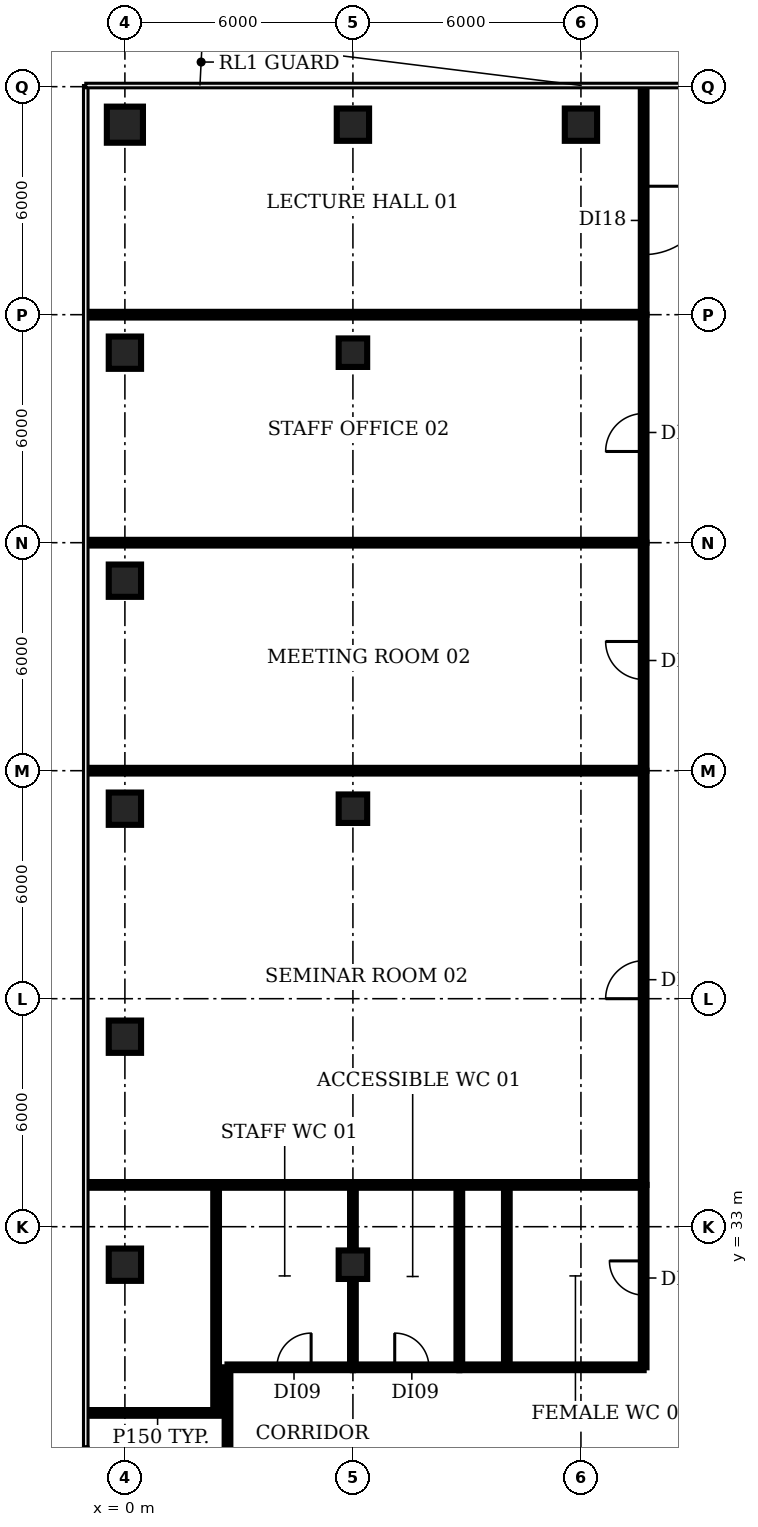
"""IFC4 building model, lengths in metres.
Left out: names, types, materials, properties, quantities, classifications, styles, units other than length and angle.
Written with IfcOpenShell. Run it as: python <this file> out.ifc"""

import sys

from ifc_helpers import new_model, si_unit, direction, frame, frame_2d, origin, origin_2d, place, context, subcontext, project, spatial, rectangle, circle, extrude, element, fill, save


model = new_model("IFC4")
c1 = context("Model", 3, precision=1e-05, world=origin(), true_north=direction((0.0, 1.0)))
c2 = subcontext(c1, "Body", "Model", "MODEL_VIEW")
j1 = project(units=[si_unit("LENGTHUNIT", "METRE"), si_unit("PLANEANGLEUNIT", "RADIAN")], contexts=[c1])
p1 = place(None, origin())
s1 = spatial("IfcSite", under=j1, at=p1, CompositionType="ELEMENT")
p2 = place(p1, origin())
s2 = spatial("IfcBuilding", under=s1, at=p2, CompositionType="ELEMENT")
p3 = place(p2, frame((0.0, 0.0, 150.8)))
s3 = spatial("IfcBuildingStorey", under=s2, at=p3, CompositionType="ELEMENT", Elevation=150.8)
for number, where, z_axis, x_axis in (
    (1, (0.0, 32.0, 0.0), (0.0, 0.0, 1.0), (1.0, 0.0, 0.0)),
    (2, (0.0, 38.0, 0.0), (0.0, 0.0, 1.0), (1.0, 0.0, 0.0)),
    (3, (0.0, 44.0, 0.0), (0.0, 0.0, 1.0), (1.0, 0.0, 0.0)),
    (4, (0.0, 50.0, 0.0), (0.0, 0.0, 1.0), (1.0, 0.0, 0.0)),
    (5, (0.0, 56.0, 0.0), (0.0, 0.0, 1.0), (1.0, 0.0, 0.0)),
):
    element("IfcColumn", number, at=place(p3, frame(where, z_axis=z_axis, x_axis=x_axis)), inside=s3, PredefinedType="COLUMN", context=c2, shape_type="SweptSolid", body=[
        extrude(rectangle(XDim=0.85, YDim=0.85, at=origin_2d()), origin(), (0.0, 0.0, 1.0), 3.85),
    ])
p4 = place(p3, frame((0.0, 62.0, 0.0), z_axis=(0.0, 0.0, 1.0), x_axis=(1.0, 0.0, 0.0)))
e6 = element("IfcColumn", 6, at=p4, inside=s3, PredefinedType="COLUMN", context=c2, shape_type="SweptSolid", body=[
    extrude(circle(Radius=0.475, at=origin_2d()), origin(), (0.0, 0.0, 1.0), 3.85),
])
for number, where, z_axis, x_axis in (
    (7, (6.0, 32.0, 0.0), (0.0, 0.0, 1.0), (1.0, 0.0, 0.0)),
    (8, (6.0, 44.0, 0.0), (0.0, 0.0, 1.0), (1.0, 0.0, 0.0)),
    (9, (6.0, 56.0, 0.0), (0.0, 0.0, 1.0), (1.0, 0.0, 0.0)),
):
    element("IfcColumn", number, at=place(p3, frame(where, z_axis=z_axis, x_axis=x_axis)), inside=s3, PredefinedType="COLUMN", context=c2, shape_type="SweptSolid", body=[
        extrude(rectangle(XDim=0.75, YDim=0.75, at=origin_2d()), origin(), (0.0, 0.0, 1.0), 3.85),
    ])
for number, where, z_axis, x_axis in (
    (10, (6.0, 62.0, 0.0), (0.0, 0.0, 1.0), (1.0, 0.0, 0.0)),
    (11, (12.0, 62.0, 0.0), (0.0, 0.0, 1.0), (1.0, 0.0, 0.0)),
):
    element("IfcColumn", number, at=place(p3, frame(where, z_axis=z_axis, x_axis=x_axis)), inside=s3, PredefinedType="COLUMN", context=c2, shape_type="SweptSolid", body=[
        extrude(rectangle(XDim=0.85, YDim=0.85, at=origin_2d()), origin(), (0.0, 0.0, 1.0), 3.85),
    ])
p5 = place(p3, frame((-0.98, 28.1, 0.0), z_axis=(0.0, 0.0, 1.0), x_axis=(1.0, 0.0, 0.0)))
e12 = element("IfcWall", 12, at=p5, inside=s3, PredefinedType="PARTITIONING", context=c2, shape_type="SweptSolid", body=[
    extrude(rectangle(XDim=3.68, YDim=0.15, at=frame_2d((1.84, 0.0))), origin(), (0.0, 0.0, 1.0), 2.88),
])
p6 = place(p3, frame((-0.98, 34.1, 0.0), z_axis=(0.0, 0.0, 1.0), x_axis=(1.0, 0.0, 0.0)))
e13 = element("IfcWall", 13, at=p6, inside=s3, PredefinedType="PARTITIONING", context=c2, shape_type="SweptSolid", body=[
    extrude(rectangle(XDim=14.63, YDim=0.15, at=frame_2d((7.315, 0.0))), origin(), (0.0, 0.0, 1.0), 2.88),
])
for number, where, z_axis, x_axis in (
    (14, (-0.965, 45.0, 0.0), (0.0, 0.0, 1.0), (1.0, 0.0, 0.0)),
    (15, (-0.965, 51.0, 0.0), (0.0, 0.0, 1.0), (1.0, 0.0, 0.0)),
    (16, (-0.965, 57.0, 0.0), (0.0, 0.0, 1.0), (1.0, 0.0, 0.0)),
):
    element("IfcWall", number, at=place(p3, frame(where, z_axis=z_axis, x_axis=x_axis)), inside=s3, PredefinedType="PARTITIONING", context=c2, shape_type="SweptSolid", body=[
        extrude(rectangle(XDim=14.615, YDim=0.15, at=frame_2d((7.308, 0.0))), origin(), (0.0, 0.0, 1.0), 2.88),
    ])
p7 = place(p3, frame((2.4, 28.1, 0.0), z_axis=(0.0, 0.0, 1.0), x_axis=(0.0, 1.0, 0.0)))
e17 = element("IfcWall", 17, at=p7, inside=s3, PredefinedType="PARTITIONING", context=c2, shape_type="SweptSolid", body=[
    extrude(rectangle(XDim=6.0, YDim=0.15, at=frame_2d((3.0, 0.0))), origin(), (0.0, 0.0, 1.0), 2.88),
])
p8 = place(p3, frame((2.7, 25.4, 0.0), z_axis=(0.0, 0.0, 1.0), x_axis=(0.0, 1.0, 0.0)))
e18 = element("IfcWall", 18, at=p8, inside=s3, PredefinedType="PARTITIONING", context=c2, shape_type="SweptSolid", body=[
    extrude(rectangle(XDim=3.9, YDim=0.15, at=frame_2d((1.95, 0.0))), origin(), (0.0, 0.0, 1.0), 2.88),
])
p9 = place(p3, frame((2.7, 29.3, 0.0), z_axis=(0.0, 0.0, 1.0), x_axis=(1.0, 0.0, 0.0)))
e19 = element("IfcWall", 19, at=p9, inside=s3, PredefinedType="PARTITIONING", context=c2, shape_type="SweptSolid", body=[
    extrude(rectangle(XDim=3.3, YDim=0.15, at=frame_2d((1.65, 0.0))), origin(), (0.0, 0.0, 1.0), 2.88),
])
p10 = place(p9, frame((1.3, 0.0, 0.0)))
e20 = element("IfcOpeningElement", 20, at=p10, cuts=e19, PredefinedType="OPENING", context=c2, shape_type="SweptSolid", body=[
    extrude(rectangle(XDim=0.9, YDim=2.1, at=frame_2d((0.45, 1.05))), frame((0.0, 0.085, 0.0), z_axis=(0.0, -1.0, 0.0), x_axis=(1.0, 0.0, 0.0)), (0.0, 0.0, 1.0), 0.17),
])
p11 = place(p3, frame((6.0, 29.3, 0.0), z_axis=(0.0, 0.0, 1.0), x_axis=(0.0, 1.0, 0.0)))
e21 = element("IfcWall", 21, at=p11, inside=s3, PredefinedType="PARTITIONING", context=c2, shape_type="SweptSolid", body=[
    extrude(rectangle(XDim=4.8, YDim=0.15, at=frame_2d((2.4, 0.0))), origin(), (0.0, 0.0, 1.0), 2.88),
])
p12 = place(p3, frame((6.0, 29.3, 0.0), z_axis=(0.0, 0.0, 1.0), x_axis=(1.0, 0.0, 0.0)))
e22 = element("IfcWall", 22, at=p12, inside=s3, PredefinedType="PARTITIONING", context=c2, shape_type="SweptSolid", body=[
    extrude(rectangle(XDim=2.8, YDim=0.15, at=frame_2d((1.4, 0.0))), origin(), (0.0, 0.0, 1.0), 2.88),
])
p13 = place(p12, frame((1.1, 0.0, 0.0)))
e23 = element("IfcOpeningElement", 23, at=p13, cuts=e22, PredefinedType="OPENING", context=c2, shape_type="SweptSolid", body=[
    extrude(rectangle(XDim=0.9, YDim=2.1, at=frame_2d((0.45, 1.05))), frame((0.0, 0.085, 0.0), z_axis=(0.0, -1.0, 0.0), x_axis=(1.0, 0.0, 0.0)), (0.0, 0.0, 1.0), 0.17),
])
p14 = place(p3, frame((8.8, 29.3, 0.0), z_axis=(0.0, 0.0, 1.0), x_axis=(0.0, 1.0, 0.0)))
e24 = element("IfcWall", 24, at=p14, inside=s3, PredefinedType="PARTITIONING", context=c2, shape_type="SweptSolid", body=[
    extrude(rectangle(XDim=4.8, YDim=0.15, at=frame_2d((2.4, 0.0))), origin(), (0.0, 0.0, 1.0), 2.88),
])
p15 = place(p3, frame((8.8, 29.3, 0.0), z_axis=(0.0, 0.0, 1.0), x_axis=(1.0, 0.0, 0.0)))
e25 = element("IfcWall", 25, at=p15, inside=s3, PredefinedType="PARTITIONING", context=c2, shape_type="SweptSolid", body=[
    extrude(rectangle(XDim=4.85, YDim=0.15, at=frame_2d((2.425, 0.0))), origin(), (0.0, 0.0, 1.0), 2.88),
])
p16 = place(p3, frame((10.05, 29.3, 0.0), z_axis=(0.0, 0.0, 1.0), x_axis=(0.0, 1.0, 0.0)))
e26 = element("IfcWall", 26, at=p16, inside=s3, PredefinedType="PARTITIONING", context=c2, shape_type="SweptSolid", body=[
    extrude(rectangle(XDim=4.8, YDim=0.15, at=frame_2d((2.4, 0.0))), origin(), (0.0, 0.0, 1.0), 2.88),
])
p17 = place(p3, frame((13.65, 29.3, 0.0), z_axis=(0.0, 0.0, 1.0), x_axis=(0.0, 1.0, 0.0)))
e27 = element("IfcWall", 27, at=p17, inside=s3, PredefinedType="PARTITIONING", context=c2, shape_type="SweptSolid", body=[
    extrude(rectangle(XDim=4.8, YDim=0.15, at=frame_2d((2.4, 0.0))), origin(), (0.0, 0.0, 1.0), 2.88),
])
p18 = place(p17, frame((1.9, 0.0, 0.0)))
e28 = element("IfcOpeningElement", 28, at=p18, cuts=e27, PredefinedType="OPENING", context=c2, shape_type="SweptSolid", body=[
    extrude(rectangle(XDim=0.9, YDim=2.1, at=frame_2d((0.45, 1.05))), frame((0.0, 0.085, 0.0), z_axis=(0.0, -1.0, 0.0), x_axis=(1.0, 0.0, 0.0)), (0.0, 0.0, 1.0), 0.17),
])
p19 = place(p3, frame((13.65, 34.1, 0.0), z_axis=(0.0, 0.0, 1.0), x_axis=(0.0, 1.0, 0.0)))
e29 = element("IfcWall", 29, at=p19, inside=s3, PredefinedType="PARTITIONING", context=c2, shape_type="SweptSolid", body=[
    extrude(rectangle(XDim=10.9, YDim=0.15, at=frame_2d((5.45, 0.0))), origin(), (0.0, 0.0, 1.0), 2.88),
])
p20 = place(p19, frame((4.9, 0.0, 0.0)))
e30 = element("IfcOpeningElement", 30, at=p20, cuts=e29, PredefinedType="OPENING", context=c2, shape_type="SweptSolid", body=[
    extrude(rectangle(XDim=1.0, YDim=2.1, at=frame_2d((0.5, 1.05))), frame((0.0, 0.085, 0.0), z_axis=(0.0, -1.0, 0.0), x_axis=(1.0, 0.0, 0.0)), (0.0, 0.0, 1.0), 0.17),
])
p21 = place(p3, frame((13.65, 45.0, 0.0), z_axis=(0.0, 0.0, 1.0), x_axis=(0.0, 1.0, 0.0)))
e31 = element("IfcWall", 31, at=p21, inside=s3, PredefinedType="PARTITIONING", context=c2, shape_type="SweptSolid", body=[
    extrude(rectangle(XDim=6.0, YDim=0.15, at=frame_2d((3.0, 0.0))), origin(), (0.0, 0.0, 1.0), 2.88),
])
p22 = place(p21, frame((2.4, 0.0, 0.0)))
e32 = element("IfcOpeningElement", 32, at=p22, cuts=e31, PredefinedType="OPENING", context=c2, shape_type="SweptSolid", body=[
    extrude(rectangle(XDim=1.0, YDim=2.1, at=frame_2d((0.5, 1.05))), frame((0.0, 0.085, 0.0), z_axis=(0.0, -1.0, 0.0), x_axis=(1.0, 0.0, 0.0)), (0.0, 0.0, 1.0), 0.17),
])
p23 = place(p3, frame((13.65, 51.0, 0.0), z_axis=(0.0, 0.0, 1.0), x_axis=(0.0, 1.0, 0.0)))
e33 = element("IfcWall", 33, at=p23, inside=s3, PredefinedType="PARTITIONING", context=c2, shape_type="SweptSolid", body=[
    extrude(rectangle(XDim=6.0, YDim=0.15, at=frame_2d((3.0, 0.0))), origin(), (0.0, 0.0, 1.0), 2.88),
])
p24 = place(p23, frame((2.4, 0.0, 0.0)))
e34 = element("IfcOpeningElement", 34, at=p24, cuts=e33, PredefinedType="OPENING", context=c2, shape_type="SweptSolid", body=[
    extrude(rectangle(XDim=1.0, YDim=2.1, at=frame_2d((0.5, 1.05))), frame((0.0, 0.085, 0.0), z_axis=(0.0, -1.0, 0.0), x_axis=(1.0, 0.0, 0.0)), (0.0, 0.0, 1.0), 0.17),
])
p25 = place(p3, frame((13.65, 62.98, 0.0), z_axis=(0.0, 0.0, 1.0), x_axis=(0.0, -1.0, 0.0)))
e35 = element("IfcWall", 35, at=p25, inside=s3, PredefinedType="PARTITIONING", context=c2, shape_type="SweptSolid", body=[
    extrude(rectangle(XDim=5.98, YDim=0.15, at=frame_2d((2.99, 0.0))), origin(), (0.0, 0.0, 1.0), 2.88),
])
p26 = place(p25, frame((2.6, 0.0, 0.0)))
e36 = element("IfcOpeningElement", 36, at=p26, cuts=e35, PredefinedType="OPENING", context=c2, shape_type="SweptSolid", body=[
    extrude(rectangle(XDim=1.8, YDim=2.1, at=frame_2d((0.9, 1.05))), frame((0.0, 0.085, 0.0), z_axis=(0.0, -1.0, 0.0), x_axis=(1.0, 0.0, 0.0)), (0.0, 0.0, 1.0), 0.17),
])
p27 = place(p10, origin())
e37 = element("IfcDoor", 37, at=p27, inside=s3, OperationType="SINGLE_SWING_RIGHT", PredefinedType="DOOR", context=c2, shape_type="SweptSolid", body=[
    extrude(rectangle(XDim=0.9, YDim=2.1, at=frame_2d((0.45, 1.05))), frame((0.0, 0.025, 0.0), z_axis=(0.0, -1.0, 0.0), x_axis=(1.0, 0.0, 0.0)), (0.0, 0.0, 1.0), 0.05),
])
fill(e20, e37)
p28 = place(p13, origin())
e38 = element("IfcDoor", 38, at=p28, inside=s3, OperationType="SINGLE_SWING_LEFT", PredefinedType="DOOR", context=c2, shape_type="SweptSolid", body=[
    extrude(rectangle(XDim=0.9, YDim=2.1, at=frame_2d((0.45, 1.05))), frame((0.0, 0.025, 0.0), z_axis=(0.0, -1.0, 0.0), x_axis=(1.0, 0.0, 0.0)), (0.0, 0.0, 1.0), 0.05),
])
fill(e23, e38)
p29 = place(p18, origin())
e39 = element("IfcDoor", 39, at=p29, inside=s3, OperationType="SINGLE_SWING_RIGHT", PredefinedType="DOOR", context=c2, shape_type="SweptSolid", body=[
    extrude(rectangle(XDim=0.9, YDim=2.1, at=frame_2d((0.45, 1.05))), frame((0.0, 0.025, 0.0), z_axis=(0.0, -1.0, 0.0), x_axis=(1.0, 0.0, 0.0)), (0.0, 0.0, 1.0), 0.05),
])
fill(e28, e39)
p30 = place(p20, origin())
e40 = element("IfcDoor", 40, at=p30, inside=s3, OperationType="SINGLE_SWING_LEFT", PredefinedType="DOOR", context=c2, shape_type="SweptSolid", body=[
    extrude(rectangle(XDim=1.0, YDim=2.1, at=frame_2d((0.5, 1.05))), frame((0.0, 0.025, 0.0), z_axis=(0.0, -1.0, 0.0), x_axis=(1.0, 0.0, 0.0)), (0.0, 0.0, 1.0), 0.05),
])
fill(e30, e40)
p31 = place(p22, origin())
e41 = element("IfcDoor", 41, at=p31, inside=s3, OperationType="SINGLE_SWING_RIGHT", PredefinedType="DOOR", context=c2, shape_type="SweptSolid", body=[
    extrude(rectangle(XDim=1.0, YDim=2.1, at=frame_2d((0.5, 1.05))), frame((0.0, 0.025, 0.0), z_axis=(0.0, -1.0, 0.0), x_axis=(1.0, 0.0, 0.0)), (0.0, 0.0, 1.0), 0.05),
])
fill(e32, e41)
p32 = place(p24, origin())
e42 = element("IfcDoor", 42, at=p32, inside=s3, OperationType="SINGLE_SWING_LEFT", PredefinedType="DOOR", context=c2, shape_type="SweptSolid", body=[
    extrude(rectangle(XDim=1.0, YDim=2.1, at=frame_2d((0.5, 1.05))), frame((0.0, 0.025, 0.0), z_axis=(0.0, -1.0, 0.0), x_axis=(1.0, 0.0, 0.0)), (0.0, 0.0, 1.0), 0.05),
])
fill(e34, e42)
p33 = place(p26, origin())
e43 = element("IfcDoor", 43, at=p33, inside=s3, OperationType="SINGLE_SWING_LEFT", PredefinedType="DOOR", context=c2, shape_type="SweptSolid", body=[
    extrude(rectangle(XDim=1.8, YDim=2.1, at=frame_2d((0.9, 1.05))), frame((0.0, 0.025, 0.0), z_axis=(0.0, -1.0, 0.0), x_axis=(1.0, 0.0, 0.0)), (0.0, 0.0, 1.0), 0.05),
])
fill(e36, e43)
save(model, sys.argv[1])
